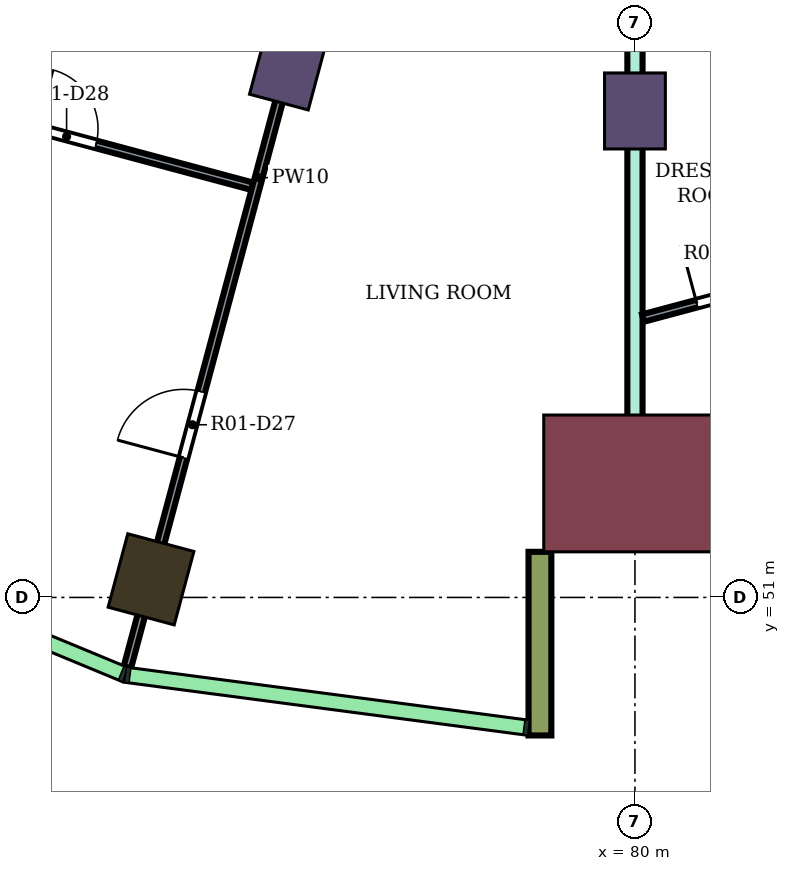
"""IFC4 building model, lengths in metres.
Left out: names, types, materials, properties, quantities, classifications, styles, units other than length and angle.
Written with IfcOpenShell. Run it as: python <this file> out.ifc"""

import sys

from ifc_helpers import new_model, si_unit, direction, frame, frame_2d, origin, origin_2d, place, context, subcontext, project, spatial, rectangle, extrude, element, fill, save


model = new_model("IFC4")
c1 = context("Model", 3, precision=1e-05, world=origin(), true_north=direction((0.0, 1.0)))
c2 = subcontext(c1, "Body", "Model", "MODEL_VIEW")
j1 = project(units=[si_unit("LENGTHUNIT", "METRE"), si_unit("PLANEANGLEUNIT", "RADIAN")], contexts=[c1])
p1 = place(None, origin())
s1 = spatial("IfcSite", under=j1, at=p1, CompositionType="ELEMENT")
p2 = place(p1, origin())
s2 = spatial("IfcBuilding", under=s1, at=p2, CompositionType="ELEMENT")
p3 = place(p2, frame((0.0, 0.0, 161.8)))
s3 = spatial("IfcBuildingStorey", under=s2, at=p3, CompositionType="ELEMENT", Elevation=161.8)
p4 = place(p3, frame((73.633, 51.238, 0.0), z_axis=(0.0, 0.0, 1.0), x_axis=(-0.258819045103, -0.965925826289, 0.0)))
e1 = element("IfcColumn", 1, at=p4, inside=s3, PredefinedType="COLUMN", context=c2, shape_type="SweptSolid", body=[
    extrude(rectangle(XDim=1.0, YDim=0.9, at=origin_2d()), origin(), (0.0, 0.0, 1.0), 4.1),
])
for number, where, z_axis, x_axis in (
    (2, (75.445, 58.0, 0.0), (0.0, 0.0, 1.0), (-0.259, -0.966, 0.0)),
    (3, (80.0, 57.4, 0.0), (0.0, 0.0, 1.0), (0.0, -1.0, 0.0)),
):
    element("IfcColumn", number, at=place(p3, frame(where, z_axis=z_axis, x_axis=x_axis)), inside=s3, PredefinedType="COLUMN", context=c2, shape_type="SweptSolid", body=[
        extrude(rectangle(XDim=1.0, YDim=0.8, at=origin_2d()), origin(), (0.0, 0.0, 1.0), 4.1),
    ])
p5 = place(p3, frame((80.0, 52.5, 0.0), z_axis=(0.0, 0.0, 1.0), x_axis=(0.0, -1.0, 0.0)))
e4 = element("IfcColumn", 4, at=p5, inside=s3, PredefinedType="COLUMN", context=c2, shape_type="SweptSolid", body=[
    extrude(rectangle(XDim=1.8, YDim=2.4, at=origin_2d()), origin(), (0.0, 0.0, 1.0), 4.1),
])
p6 = place(p3, frame((78.75, 51.6, 0.0), z_axis=(0.0, 0.0, 1.0), x_axis=(0.0, -1.0, 0.0)))
e5 = element("IfcWall", 5, at=p6, inside=s3, PredefinedType="NOTDEFINED", context=c2, shape_type="SweptSolid", body=[
    extrude(rectangle(XDim=2.416, YDim=0.3, at=frame_2d((1.208, 0.0))), origin(), (0.0, 0.0, 1.0), 4.1),
])
p7 = place(p3, frame((80.0, 51.8, 0.0), z_axis=(0.0, 0.0, 1.0), x_axis=(0.0, 1.0, 0.0)))
e6 = element("IfcWall", 6, at=p7, inside=s3, PredefinedType="PARTITIONING", context=c2, shape_type="SweptSolid", body=[
    extrude(rectangle(XDim=10.314, YDim=0.2, at=frame_2d((5.157, 0.0))), origin(), (0.0, 0.0, 1.0), 3.65),
])
p8 = place(p3, frame((67.101, 52.659, 0.0), z_axis=(0.0, 0.0, 1.0), x_axis=(0.499985055897, 0.866034031594, 0.0)))
e7 = element("IfcWall", 7, at=p8, inside=s3, PredefinedType="PARTITIONING", context=c2, shape_type="SweptSolid", body=[
    extrude(rectangle(XDim=12.876, YDim=0.1, at=frame_2d((6.438, 0.0))), origin(), (0.0, 0.0, 1.0), 3.65),
])
p9 = place(p8, frame((2.504, 0.0, 0.0)))
e8 = element("IfcOpeningElement", 8, at=p9, cuts=e7, PredefinedType="OPENING", context=c2, shape_type="SweptSolid", body=[
    extrude(rectangle(XDim=0.9, YDim=2.1, at=frame_2d((0.45, 1.05))), frame((0.0, 0.06, 0.0), z_axis=(0.0, -1.0, 0.0), x_axis=(1.0, 0.0, 0.0)), (0.0, 0.0, 1.0), 0.12),
])
p10 = place(p3, frame((70.088, 57.717, 0.0), z_axis=(0.0, 0.0, 1.0), x_axis=(0.965906836082, -0.258889907124, 0.0)))
e9 = element("IfcWall", 9, at=p10, inside=s3, PredefinedType="PARTITIONING", context=c2, shape_type="SweptSolid", body=[
    extrude(rectangle(XDim=5.051, YDim=0.1, at=frame_2d((2.525, 0.0))), origin(), (0.0, 0.0, 1.0), 3.65),
])
p11 = place(p10, frame((2.121, 0.0, 0.0)))
e10 = element("IfcOpeningElement", 10, at=p11, cuts=e9, PredefinedType="OPENING", context=c2, shape_type="SweptSolid", body=[
    extrude(rectangle(XDim=0.8, YDim=2.1, at=frame_2d((0.4, 1.05))), frame((0.0, 0.06, 0.0), z_axis=(0.0, -1.0, 0.0), x_axis=(1.0, 0.0, 0.0)), (0.0, 0.0, 1.0), 0.12),
])
p12 = place(p3, frame((73.322, 50.081, 0.0), z_axis=(0.0, 0.0, 1.0), x_axis=(0.258982801816, 0.965881932931, 0.0)))
e11 = element("IfcWall", 11, at=p12, inside=s3, PredefinedType="PARTITIONING", context=c2, shape_type="SweptSolid", body=[
    extrude(rectangle(XDim=13.338, YDim=0.1, at=frame_2d((6.669, 0.0))), origin(), (0.0, 0.0, 1.0), 3.65),
])
p13 = place(p12, frame((2.854, 0.0, 0.0)))
e12 = element("IfcOpeningElement", 12, at=p13, cuts=e11, PredefinedType="OPENING", context=c2, shape_type="SweptSolid", body=[
    extrude(rectangle(XDim=0.9, YDim=2.1, at=frame_2d((0.45, 1.05))), frame((0.0, 0.06, 0.0), z_axis=(0.0, -1.0, 0.0), x_axis=(1.0, 0.0, 0.0)), (0.0, 0.0, 1.0), 0.12),
])
p14 = place(p12, frame((10.528, 0.0, 0.0)))
e13 = element("IfcOpeningElement", 13, at=p14, cuts=e11, PredefinedType="OPENING", context=c2, shape_type="SweptSolid", body=[
    extrude(rectangle(XDim=0.8, YDim=2.1, at=frame_2d((0.4, 1.05))), frame((0.0, 0.06, 0.0), z_axis=(0.0, -1.0, 0.0), x_axis=(1.0, 0.0, 0.0)), (0.0, 0.0, 1.0), 0.12),
])
p15 = place(p3, frame((80.106, 54.676, 0.0), z_axis=(0.0, 0.0, 1.0), x_axis=(0.965976901679, 0.258628353863, 0.0)))
e14 = element("IfcWall", 14, at=p15, inside=s3, PredefinedType="PARTITIONING", context=c2, shape_type="SweptSolid", body=[
    extrude(rectangle(XDim=5.097, YDim=0.1, at=frame_2d((2.549, 0.0))), origin(), (0.0, 0.0, 1.0), 3.65),
])
p16 = place(p15, frame((0.733, 0.0, 0.0)))
e15 = element("IfcOpeningElement", 15, at=p16, cuts=e14, PredefinedType="OPENING", context=c2, shape_type="SweptSolid", body=[
    extrude(rectangle(XDim=0.8, YDim=2.1, at=frame_2d((0.4, 1.05))), frame((0.0, 0.06, 0.0), z_axis=(0.0, -1.0, 0.0), x_axis=(1.0, 0.0, 0.0)), (0.0, 0.0, 1.0), 0.12),
])
p17 = place(p3, frame((80.519, 62.239, 0.0), z_axis=(0.0, 0.0, 1.0), x_axis=(0.25878046533, -0.965936162882, 0.0)))
e16 = element("IfcWall", 16, at=p17, inside=s3, PredefinedType="PARTITIONING", context=c2, shape_type="SweptSolid", body=[
    extrude(rectangle(XDim=7.149, YDim=0.1, at=frame_2d((3.575, 0.0))), origin(), (0.0, 0.0, 1.0), 3.65),
])
p18 = place(p16, origin())
e17 = element("IfcDoor", 17, at=p18, inside=s3, OperationType="SINGLE_SWING_LEFT", PredefinedType="DOOR", context=c2, shape_type="SweptSolid", body=[
    extrude(rectangle(XDim=0.8, YDim=2.1, at=frame_2d((0.4, 1.05))), frame((0.0, 0.025, 0.0), z_axis=(0.0, -1.0, 0.0), x_axis=(1.0, 0.0, 0.0)), (0.0, 0.0, 1.0), 0.05),
])
fill(e15, e17)
p19 = place(p13, origin())
e18 = element("IfcDoor", 18, at=p19, inside=s3, OperationType="SINGLE_SWING_LEFT", PredefinedType="DOOR", context=c2, shape_type="SweptSolid", body=[
    extrude(rectangle(XDim=0.9, YDim=2.1, at=frame_2d((0.45, 1.05))), frame((0.0, 0.025, 0.0), z_axis=(0.0, -1.0, 0.0), x_axis=(1.0, 0.0, 0.0)), (0.0, 0.0, 1.0), 0.05),
])
fill(e12, e18)
p20 = place(p11, origin())
e19 = element("IfcDoor", 19, at=p20, inside=s3, OperationType="SINGLE_SWING_LEFT", PredefinedType="DOOR", context=c2, shape_type="SweptSolid", body=[
    extrude(rectangle(XDim=0.8, YDim=2.1, at=frame_2d((0.4, 1.05))), frame((0.0, 0.025, 0.0), z_axis=(0.0, -1.0, 0.0), x_axis=(1.0, 0.0, 0.0)), (0.0, 0.0, 1.0), 0.05),
])
fill(e10, e19)
save(model, sys.argv[1])
